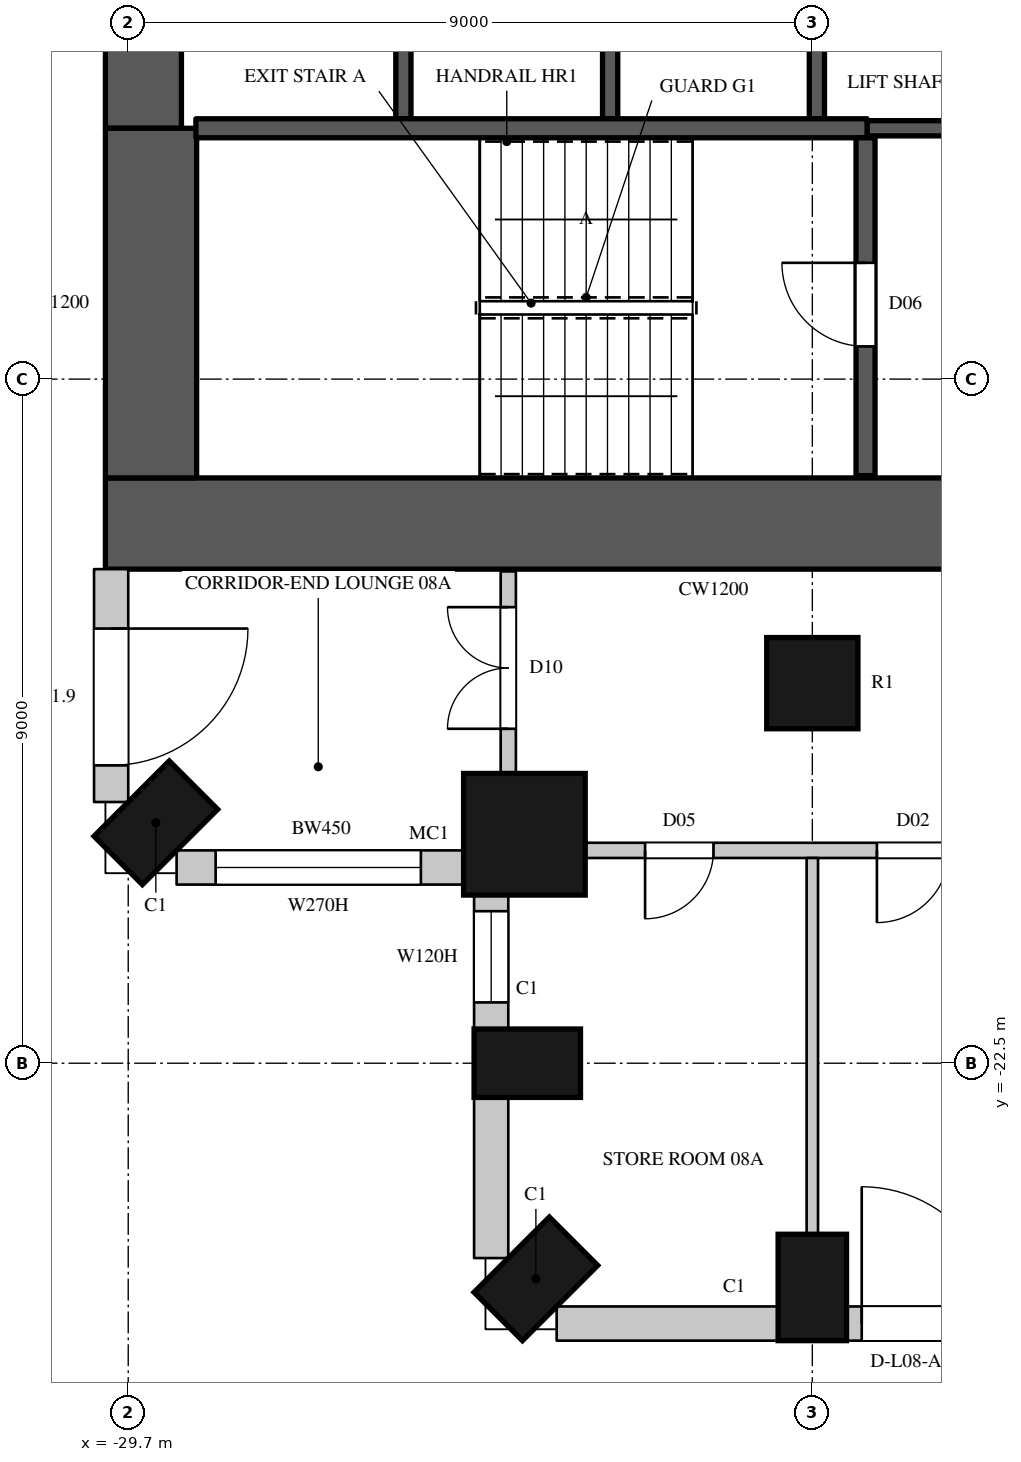
"""IFC4 building model, lengths in metres.
Left out: names, types, materials, properties, quantities, classifications, styles, units other than length and angle.
Written with IfcOpenShell. Run it as: python <this file> out.ifc"""

import sys

from ifc_helpers import new_model, si_unit, direction, frame, frame_2d, origin, origin_2d, place, context, subcontext, project, spatial, rectangle, circle, extrude, element, fill, save


model = new_model("IFC4")
c1 = context("Model", 3, precision=1e-05, world=origin(), true_north=direction((0.0, 1.0)))
c2 = subcontext(c1, "Body", "Model", "MODEL_VIEW")
j1 = project(units=[si_unit("LENGTHUNIT", "METRE"), si_unit("PLANEANGLEUNIT", "RADIAN")], contexts=[c1])
p1 = place(None, origin())
s1 = spatial("IfcSite", under=j1, at=p1, CompositionType="ELEMENT")
p2 = place(p1, origin())
s2 = spatial("IfcBuilding", under=s1, at=p2, CompositionType="ELEMENT")
p3 = place(p2, frame((0.0, 0.0, 59.1)))
s3 = spatial("IfcBuildingStorey", under=s2, at=p3, CompositionType="ELEMENT", Elevation=59.1)
p4 = place(p3, frame((-29.337, -19.337, 0.0), z_axis=(0.0, 0.0, 1.0), x_axis=(0.707106781187, -0.707106781187, 0.0)))
e1 = element("IfcColumn", 1, at=p4, inside=s3, PredefinedType="COLUMN", context=c2, shape_type="SweptSolid", body=[
    extrude(rectangle(XDim=0.9, YDim=1.4, at=origin_2d()), origin(), (0.0, 0.0, 1.0), 3.6),
])
p5 = place(p3, frame((-24.488, -19.488, 0.0), z_axis=(0.0, 0.0, 1.0), x_axis=(1.0, 0.0, 0.0)))
e2 = element("IfcColumn", 2, at=p5, inside=s3, PredefinedType="COLUMN", context=c2, shape_type="SweptSolid", body=[
    extrude(circle(Radius=0.8, at=origin_2d()), origin(), (0.0, 0.0, 1.0), 3.6),
])
for number, where, z_axis, x_axis in (
    (3, (-24.45, -22.5, 0.0), (0.0, 0.0, 1.0), (0.0, -1.0, 0.0)),
    (4, (-24.337, -25.337, 0.0), (0.0, 0.0, 1.0), (0.707, -0.707, 0.0)),
    (5, (-20.7, -25.45, 0.0), (0.0, 0.0, 1.0), (1.0, 0.0, 0.0)),
):
    element("IfcColumn", number, at=place(p3, frame(where, z_axis=z_axis, x_axis=x_axis)), inside=s3, PredefinedType="COLUMN", context=c2, shape_type="SweptSolid", body=[
        extrude(rectangle(XDim=0.9, YDim=1.4, at=origin_2d()), origin(), (0.0, 0.0, 1.0), 3.6),
    ])
p6 = place(p3, frame((-20.7, -17.5, 0.0), z_axis=(0.0, 0.0, 1.0), x_axis=(1.0, 0.0, 0.0)))
e6 = element("IfcColumn", 6, at=p6, inside=s3, PredefinedType="COLUMN", context=c2, shape_type="SweptSolid", body=[
    extrude(circle(Radius=0.6, at=origin_2d()), origin(), (0.0, 0.0, 1.0), 3.6),
])
p7 = place(p3, frame((-29.925, -16.0, 0.0), z_axis=(0.0, 0.0, 1.0), x_axis=(0.0, -1.0, 0.0)))
e7 = element("IfcWall", 7, at=p7, inside=s3, PredefinedType="SOLIDWALL", context=c2, shape_type="SweptSolid", body=[
    extrude(rectangle(XDim=3.064, YDim=0.45, at=frame_2d((1.532, 0.0))), origin(), (0.0, 0.0, 1.0), 3.3),
])
p8 = place(p7, frame((0.782, 0.0, 0.0)))
e8 = element("IfcOpeningElement", 8, at=p8, cuts=e7, PredefinedType="OPENING", context=c2, shape_type="SweptSolid", body=[
    extrude(rectangle(XDim=1.8, YDim=2.4, at=frame_2d((0.9, 1.2))), frame((0.0, 0.235, 0.0), z_axis=(0.0, -1.0, 0.0), x_axis=(1.0, 0.0, 0.0)), (0.0, 0.0, 1.0), 0.47),
])
p9 = place(p3, frame((-29.064, -19.925, 0.0), z_axis=(0.0, 0.0, 1.0), x_axis=(1.0, 0.0, 0.0)))
e9 = element("IfcWall", 9, at=p9, inside=s3, PredefinedType="SOLIDWALL", context=c2, shape_type="SweptSolid", body=[
    extrude(rectangle(XDim=3.805, YDim=0.45, at=frame_2d((1.903, 0.0))), origin(), (0.0, 0.0, 1.0), 3.3),
])
p10 = place(p9, frame((0.514, 0.0, 1.05)))
e10 = element("IfcOpeningElement", 10, at=p10, cuts=e9, PredefinedType="OPENING", context=c2, shape_type="SweptSolid", body=[
    extrude(rectangle(XDim=2.7, YDim=2.0, at=frame_2d((1.35, 1.0))), frame((0.0, 0.235, 0.0), z_axis=(0.0, -1.0, 0.0), x_axis=(1.0, 0.0, 0.0)), (0.0, 0.0, 1.0), 0.47),
])
p11 = place(p3, frame((-24.925, -20.259, 0.0), z_axis=(0.0, 0.0, 1.0), x_axis=(0.0, -1.0, 0.0)))
e11 = element("IfcWall", 11, at=p11, inside=s3, PredefinedType="SOLIDWALL", context=c2, shape_type="SweptSolid", body=[
    extrude(rectangle(XDim=1.792, YDim=0.45, at=frame_2d((0.896, 0.0))), origin(), (0.0, 0.0, 1.0), 3.3),
])
p12 = place(p11, frame((0.241, 0.0, 1.05)))
e12 = element("IfcOpeningElement", 12, at=p12, cuts=e11, PredefinedType="OPENING", context=c2, shape_type="SweptSolid", body=[
    extrude(rectangle(XDim=1.2, YDim=2.0, at=frame_2d((0.6, 1.0))), frame((0.0, 0.235, 0.0), z_axis=(0.0, -1.0, 0.0), x_axis=(1.0, 0.0, 0.0)), (0.0, 0.0, 1.0), 0.47),
])
p13 = place(p3, frame((-24.925, -22.95, 0.0), z_axis=(0.0, 0.0, 1.0), x_axis=(0.0, -1.0, 0.0)))
e13 = element("IfcWall", 13, at=p13, inside=s3, PredefinedType="SOLIDWALL", context=c2, shape_type="SweptSolid", body=[
    extrude(rectangle(XDim=2.114, YDim=0.45, at=frame_2d((1.057, 0.0))), origin(), (0.0, 0.0, 1.0), 3.3),
])
p14 = place(p3, frame((-24.064, -25.925, 0.0), z_axis=(0.0, 0.0, 1.0), x_axis=(1.0, 0.0, 0.0)))
e14 = element("IfcWall", 14, at=p14, inside=s3, PredefinedType="SOLIDWALL", context=c2, shape_type="SweptSolid", body=[
    extrude(rectangle(XDim=2.914, YDim=0.45, at=frame_2d((1.457, 0.0))), origin(), (0.0, 0.0, 1.0), 3.3),
])
p15 = place(p3, frame((-20.25, -25.925, 0.0), z_axis=(0.0, 0.0, 1.0), x_axis=(1.0, 0.0, 0.0)))
e15 = element("IfcWall", 15, at=p15, inside=s3, PredefinedType="SOLIDWALL", context=c2, shape_type="SweptSolid", body=[
    extrude(rectangle(XDim=8.1, YDim=0.45, at=frame_2d((4.05, 0.0))), origin(), (0.0, 0.0, 1.0), 3.3),
])
p16 = place(p15, frame((0.2, 0.0, 0.0)))
e16 = element("IfcOpeningElement", 16, at=p16, cuts=e15, PredefinedType="OPENING", context=c2, shape_type="SweptSolid", body=[
    extrude(rectangle(XDim=1.8, YDim=2.4, at=frame_2d((0.9, 1.2))), frame((0.0, 0.235, 0.0), z_axis=(0.0, -1.0, 0.0), x_axis=(1.0, 0.0, 0.0)), (0.0, 0.0, 1.0), 0.47),
])
p17 = place(p15, frame((2.2, 0.0, 1.05)))
e17 = element("IfcOpeningElement", 17, at=p17, cuts=e15, PredefinedType="OPENING", context=c2, shape_type="SweptSolid", body=[
    extrude(rectangle(XDim=1.2, YDim=2.0, at=frame_2d((0.6, 1.0))), frame((0.0, 0.235, 0.0), z_axis=(0.0, -1.0, 0.0), x_axis=(1.0, 0.0, 0.0)), (0.0, 0.0, 1.0), 0.47),
])
p18 = place(p15, frame((4.7, 0.0, 0.0)))
e18 = element("IfcOpeningElement", 18, at=p18, cuts=e15, PredefinedType="OPENING", context=c2, shape_type="SweptSolid", body=[
    extrude(rectangle(XDim=1.8, YDim=2.4, at=frame_2d((0.9, 1.2))), frame((0.0, 0.235, 0.0), z_axis=(0.0, -1.0, 0.0), x_axis=(1.0, 0.0, 0.0)), (0.0, 0.0, 1.0), 0.47),
])
p19 = place(p15, frame((6.7, 0.0, 1.05)))
e19 = element("IfcOpeningElement", 19, at=p19, cuts=e15, PredefinedType="OPENING", context=c2, shape_type="SweptSolid", body=[
    extrude(rectangle(XDim=1.2, YDim=2.0, at=frame_2d((0.6, 1.0))), frame((0.0, 0.235, 0.0), z_axis=(0.0, -1.0, 0.0), x_axis=(1.0, 0.0, 0.0)), (0.0, 0.0, 1.0), 0.47),
])
p20 = place(p3, frame((-30.0, -15.4, 0.0), z_axis=(0.0, 0.0, 1.0), x_axis=(1.0, 0.0, 0.0)))
e20 = element("IfcWall", 20, at=p20, inside=s3, PredefinedType="SHEAR", context=c2, shape_type="SweptSolid", body=[
    extrude(rectangle(XDim=16.0, YDim=1.2, at=frame_2d((8.0, 0.0))), origin(), (0.0, 0.0, 1.0), 3.6),
])
p21 = place(p20, frame((13.4, 0.0, 0.0)))
e21 = element("IfcOpeningElement", 21, at=p21, cuts=e20, PredefinedType="OPENING", context=c2, shape_type="SweptSolid", body=[
    extrude(rectangle(XDim=1.5, YDim=2.4, at=frame_2d((0.75, 1.2))), frame((0.0, 0.61, 0.0), z_axis=(0.0, -1.0, 0.0), x_axis=(1.0, 0.0, 0.0)), (0.0, 0.0, 1.0), 1.22),
])
p22 = place(p3, frame((-29.5, -10.2, 0.0), z_axis=(0.0, 0.0, 1.0), x_axis=(0.0, 1.0, 0.0)))
e22 = element("IfcWall", 22, at=p22, inside=s3, PredefinedType="SHEAR", context=c2, shape_type="SweptSolid", body=[
    extrude(rectangle(XDim=20.4, YDim=1.0, at=frame_2d((10.2, 0.0))), origin(), (0.0, 0.0, 1.0), 3.6),
])
p23 = place(p3, frame((-29.4, -14.8, 0.0), z_axis=(0.0, 0.0, 1.0), x_axis=(0.0, 1.0, 0.0)))
e23 = element("IfcWall", 23, at=p23, inside=s3, PredefinedType="SHEAR", context=c2, shape_type="SweptSolid", body=[
    extrude(rectangle(XDim=4.6, YDim=1.2, at=frame_2d((2.3, 0.0))), origin(), (0.0, 0.0, 1.0), 3.6),
])
p24 = place(p3, frame((-24.7, -18.7, 0.0), z_axis=(0.0, 0.0, 1.0), x_axis=(0.0, 1.0, 0.0)))
e24 = element("IfcWall", 24, at=p24, inside=s3, PredefinedType="PARTITIONING", context=c2, shape_type="SweptSolid", body=[
    extrude(rectangle(XDim=2.67, YDim=0.2, at=frame_2d((1.335, 0.0))), origin(), (0.0, 0.0, 1.0), 3.3),
])
p25 = place(p24, frame((0.6, 0.0, 0.0)))
e25 = element("IfcOpeningElement", 25, at=p25, cuts=e24, PredefinedType="OPENING", context=c2, shape_type="SweptSolid", body=[
    extrude(rectangle(XDim=1.6, YDim=2.4, at=frame_2d((0.8, 1.2))), frame((0.0, 0.11, 0.0), z_axis=(0.0, -1.0, 0.0), x_axis=(1.0, 0.0, 0.0)), (0.0, 0.0, 1.0), 0.22),
])
p26 = place(p3, frame((-23.7, -19.7, 0.0), z_axis=(0.0, 0.0, 1.0), x_axis=(1.0, 0.0, 0.0)))
e26 = element("IfcWall", 26, at=p26, inside=s3, PredefinedType="PARTITIONING", context=c2, shape_type="SweptSolid", body=[
    extrude(rectangle(XDim=5.1, YDim=0.2, at=frame_2d((2.55, 0.0))), origin(), (0.0, 0.0, 1.0), 3.3),
])
p27 = place(p26, frame((0.8, 0.0, 0.0)))
e27 = element("IfcOpeningElement", 27, at=p27, cuts=e26, PredefinedType="OPENING", context=c2, shape_type="SweptSolid", body=[
    extrude(rectangle(XDim=0.9, YDim=2.2, at=frame_2d((0.45, 1.1))), frame((0.0, 0.11, 0.0), z_axis=(0.0, -1.0, 0.0), x_axis=(1.0, 0.0, 0.0)), (0.0, 0.0, 1.0), 0.22),
])
p28 = place(p26, frame((3.85, 0.0, 0.0)))
e28 = element("IfcOpeningElement", 28, at=p28, cuts=e26, PredefinedType="OPENING", context=c2, shape_type="SweptSolid", body=[
    extrude(rectangle(XDim=0.95, YDim=2.2, at=frame_2d((0.475, 1.1))), frame((0.0, 0.11, 0.0), z_axis=(0.0, -1.0, 0.0), x_axis=(1.0, 0.0, 0.0)), (0.0, 0.0, 1.0), 0.22),
])
p29 = place(p3, frame((-20.7, -24.75, 0.0), z_axis=(0.0, 0.0, 1.0), x_axis=(0.0, 1.0, 0.0)))
e29 = element("IfcWall", 29, at=p29, inside=s3, PredefinedType="PARTITIONING", context=c2, shape_type="SweptSolid", body=[
    extrude(rectangle(XDim=4.95, YDim=0.15, at=frame_2d((2.475, 0.0))), origin(), (0.0, 0.0, 1.0), 2.75),
])
for number, where, z_axis, x_axis in (
    (30, (-26.08, -10.075, 0.0), (0.0, 0.0, 1.0), (0.0, 1.0, 0.0)),
    (31, (-23.36, -10.075, 0.0), (0.0, 0.0, 1.0), (0.0, 1.0, 0.0)),
    (32, (-20.64, -10.075, 0.0), (0.0, 0.0, 1.0), (0.0, 1.0, 0.0)),
):
    element("IfcWall", number, at=place(p3, frame(where, z_axis=z_axis, x_axis=x_axis)), inside=s3, PredefinedType="SHEAR", context=c2, shape_type="SweptSolid", body=[
        extrude(rectangle(XDim=2.575, YDim=0.2, at=frame_2d((1.288, 0.0))), origin(), (0.0, 0.0, 1.0), 3.6),
    ])
p30 = place(p3, frame((-19.98, -10.2, 0.0), z_axis=(0.0, 0.0, 1.0), x_axis=(1.0, 0.0, 0.0)))
e33 = element("IfcWall", 33, at=p30, inside=s3, PredefinedType="SHEAR", context=c2, shape_type="SweptSolid", body=[
    extrude(rectangle(XDim=4.95, YDim=0.2, at=frame_2d((2.475, 0.0))), origin(), (0.0, 0.0, 1.0), 3.3),
])
p31 = place(p30, frame((2.95, 0.0, 0.0)))
e34 = element("IfcOpeningElement", 34, at=p31, cuts=e33, PredefinedType="OPENING", context=c2, shape_type="SweptSolid", body=[
    extrude(rectangle(XDim=1.1, YDim=2.2, at=frame_2d((0.55, 1.1))), frame((0.0, 0.11, 0.0), z_axis=(0.0, -1.0, 0.0), x_axis=(1.0, 0.0, 0.0)), (0.0, 0.0, 1.0), 0.22),
])
p32 = place(p3, frame((-28.81, -10.2, 0.0), z_axis=(0.0, 0.0, 1.0), x_axis=(1.0, 0.0, 0.0)))
e35 = element("IfcWall", 35, at=p32, inside=s3, PredefinedType="SHEAR", context=c2, shape_type="SweptSolid", body=[
    extrude(rectangle(XDim=8.83, YDim=0.25, at=frame_2d((4.415, 0.0))), origin(), (0.0, 0.0, 1.0), 3.3),
])
p33 = place(p3, frame((-20.0, -14.77, 0.0), z_axis=(0.0, 0.0, 1.0), x_axis=(0.0, 1.0, 0.0)))
e36 = element("IfcWall", 36, at=p33, inside=s3, PredefinedType="SHEAR", context=c2, shape_type="SweptSolid", body=[
    extrude(rectangle(XDim=4.445, YDim=0.25, at=frame_2d((2.223, 0.0))), origin(), (0.0, 0.0, 1.0), 3.3),
])
p34 = place(p33, frame((1.7, 0.0, 0.0)))
e37 = element("IfcOpeningElement", 37, at=p34, cuts=e36, PredefinedType="OPENING", context=c2, shape_type="SweptSolid", body=[
    extrude(rectangle(XDim=1.1, YDim=2.2, at=frame_2d((0.55, 1.1))), frame((0.0, 0.135, 0.0), z_axis=(0.0, -1.0, 0.0), x_axis=(1.0, 0.0, 0.0)), (0.0, 0.0, 1.0), 0.27),
])
p35 = place(p8, origin())
e38 = element("IfcDoor", 38, at=p35, inside=s3, OperationType="SLIDING_TO_LEFT", PredefinedType="DOOR", context=c2, shape_type="SweptSolid", body=[
    extrude(rectangle(XDim=1.8, YDim=2.4, at=frame_2d((0.9, 1.2))), frame((0.0, 0.13, 0.0), z_axis=(0.0, -1.0, 0.0), x_axis=(1.0, 0.0, 0.0)), (0.0, 0.0, 1.0), 0.05),
])
fill(e8, e38)
p36 = place(p10, origin())
e39 = element("IfcWindow", 39, at=p36, inside=s3, PartitioningType="SINGLE_PANEL", PredefinedType="WINDOW", context=c2, shape_type="SweptSolid", body=[
    extrude(rectangle(XDim=2.7, YDim=2.0, at=frame_2d((1.35, 1.0))), frame((0.0, 0.135, 0.0), z_axis=(0.0, -1.0, 0.0), x_axis=(1.0, 0.0, 0.0)), (0.0, 0.0, 1.0), 0.06),
])
fill(e10, e39)
p37 = place(p12, origin())
e40 = element("IfcWindow", 40, at=p37, inside=s3, PartitioningType="SINGLE_PANEL", PredefinedType="WINDOW", context=c2, shape_type="SweptSolid", body=[
    extrude(rectangle(XDim=1.2, YDim=2.0, at=frame_2d((0.6, 1.0))), frame((0.0, 0.135, 0.0), z_axis=(0.0, -1.0, 0.0), x_axis=(1.0, 0.0, 0.0)), (0.0, 0.0, 1.0), 0.06),
])
fill(e12, e40)
p38 = place(p16, origin())
e41 = element("IfcDoor", 41, at=p38, inside=s3, OperationType="SLIDING_TO_LEFT", PredefinedType="DOOR", context=c2, shape_type="SweptSolid", body=[
    extrude(rectangle(XDim=1.8, YDim=2.4, at=frame_2d((0.9, 1.2))), frame((0.0, 0.13, 0.0), z_axis=(0.0, -1.0, 0.0), x_axis=(1.0, 0.0, 0.0)), (0.0, 0.0, 1.0), 0.05),
])
fill(e16, e41)
p39 = place(p34, origin())
e42 = element("IfcDoor", 42, at=p39, inside=s3, OperationType="SINGLE_SWING_RIGHT", PredefinedType="DOOR", context=c2, shape_type="SweptSolid", body=[
    extrude(rectangle(XDim=1.1, YDim=2.2, at=frame_2d((0.55, 1.1))), frame((0.0, 0.025, 0.0), z_axis=(0.0, -1.0, 0.0), x_axis=(1.0, 0.0, 0.0)), (0.0, 0.0, 1.0), 0.05),
])
fill(e37, e42)
p40 = place(p27, origin())
e43 = element("IfcDoor", 43, at=p40, inside=s3, OperationType="SINGLE_SWING_RIGHT", PredefinedType="DOOR", context=c2, shape_type="SweptSolid", body=[
    extrude(rectangle(XDim=0.9, YDim=2.2, at=frame_2d((0.45, 1.1))), frame((0.0, 0.025, 0.0), z_axis=(0.0, -1.0, 0.0), x_axis=(1.0, 0.0, 0.0)), (0.0, 0.0, 1.0), 0.05),
])
fill(e27, e43)
p41 = place(p25, origin())
e44 = element("IfcDoor", 44, at=p41, inside=s3, OperationType="DOUBLE_DOOR_SINGLE_SWING", PredefinedType="DOOR", context=c2, shape_type="SweptSolid", body=[
    extrude(rectangle(XDim=1.6, YDim=2.4, at=frame_2d((0.8, 1.2))), frame((0.0, 0.025, 0.0), z_axis=(0.0, -1.0, 0.0), x_axis=(1.0, 0.0, 0.0)), (0.0, 0.0, 1.0), 0.05),
])
fill(e25, e44)
p42 = place(p28, origin())
e45 = element("IfcDoor", 45, at=p42, inside=s3, OperationType="SINGLE_SWING_RIGHT", PredefinedType="DOOR", context=c2, shape_type="SweptSolid", body=[
    extrude(rectangle(XDim=0.95, YDim=2.2, at=frame_2d((0.475, 1.1))), frame((0.0, 0.025, 0.0), z_axis=(0.0, -1.0, 0.0), x_axis=(1.0, 0.0, 0.0)), (0.0, 0.0, 1.0), 0.05),
])
fill(e28, e45)
save(model, sys.argv[1])
